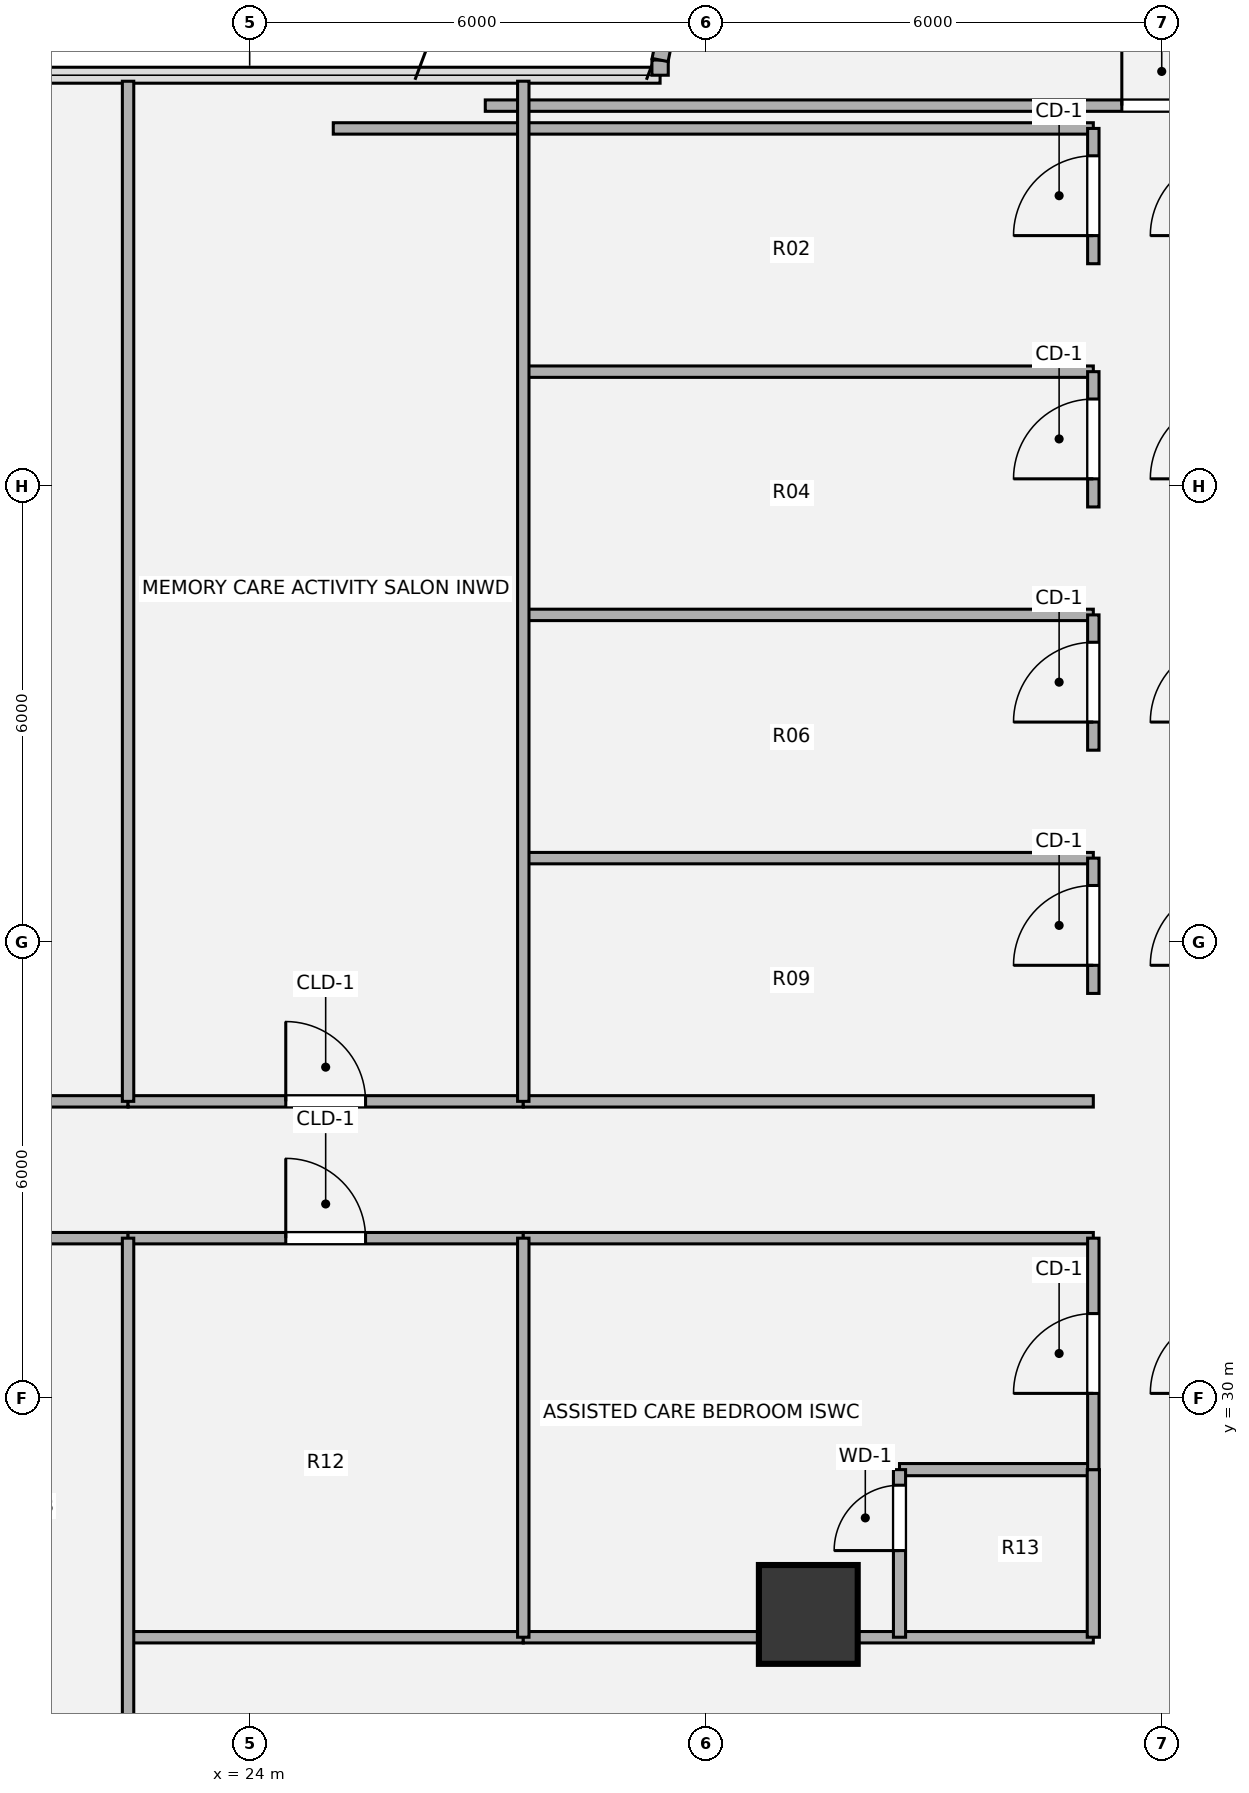
"""IFC4 building model, lengths in metres.
Left out: names, types, materials, properties, quantities, classifications, styles, units other than length and angle.
Written with IfcOpenShell. Run it as: python <this file> out.ifc"""

import sys

from ifc_helpers import new_model, si_unit, direction, frame, frame_2d, origin, origin_2d, place, context, subcontext, project, spatial, rectangle, hollow_circle, extrude, source, transform, mapped, element, fill, save


model = new_model("IFC4")
c1 = context("Model", 3, precision=1e-05, world=origin(), true_north=direction((0.0, 1.0)))
c2 = subcontext(c1, "Body", "Model", "MODEL_VIEW")
j1 = project(units=[si_unit("LENGTHUNIT", "METRE"), si_unit("PLANEANGLEUNIT", "RADIAN")], contexts=[c1])
p1 = place(None, origin())
s1 = spatial("IfcSite", under=j1, at=p1, CompositionType="ELEMENT")
p2 = place(p1, origin())
s2 = spatial("IfcBuilding", under=s1, at=p2, CompositionType="ELEMENT")
p3 = place(p2, frame((0.0, 0.0, 104.94)))
s3 = spatial("IfcBuildingStorey", under=s2, at=p3, CompositionType="ELEMENT", Elevation=104.94)
m1 = source(origin(), c2, "Body", "SweptSolid", [
    extrude(hollow_circle(Radius=0.65, WallThickness=0.045, at=origin_2d()), origin(), (0.0, 0.0, 1.0), 3.78),
])
p4 = place(p3, frame((31.35, 27.15, 0.0), z_axis=(0.0, 0.0, 1.0), x_axis=(1.0, 0.0, 0.0)))
e1 = element("IfcColumn", 1, at=p4, inside=s3, PredefinedType="COLUMN", context=c2, shape_type="MappedRepresentation", body=[
    mapped(m1, transform((0.0, 0.0, 0.0), x_axis=(1.0, 0.0, 0.0), y_axis=(0.0, 1.0, 0.0), z_axis=(0.0, 0.0, 1.0), scale=1.0)),
])
p5 = place(p3, frame((29.4, 47.4, 0.0), z_axis=(0.0, 0.0, 1.0), x_axis=(0.0, 1.0, 0.0)))
e2 = element("IfcWall", 2, at=p5, inside=s3, PredefinedType="SOLIDWALL", context=c2, shape_type="SweptSolid", body=[
    extrude(rectangle(XDim=0.2, YDim=0.215, at=frame_2d((0.1, 0.0))), origin(), (0.0, 0.0, 1.0), 3.53),
])
p6 = place(p3, frame((29.4, 47.6, 0.0), z_axis=(0.0, 0.0, 1.0), x_axis=(0.195127417394, 0.980777900945, 0.0)))
e3 = element("IfcWall", 3, at=p6, inside=s3, PredefinedType="SOLIDWALL", context=c2, shape_type="SweptSolid", body=[
    extrude(rectangle(XDim=1.092, YDim=0.215, at=frame_2d((0.546, 0.0))), origin(), (0.0, 0.0, 1.0), 3.53),
])
p7 = place(p3, frame((22.4, 26.85, 0.0), z_axis=(0.0, 0.0, 1.0), x_axis=(1.0, 0.0, 0.0)))
e4 = element("IfcWall", 4, at=p7, inside=s3, PredefinedType="PARTITIONING", context=c2, shape_type="SweptSolid", body=[
    extrude(rectangle(XDim=5.2, YDim=0.15, at=frame_2d((2.6, 0.0))), origin(), (0.0, 0.0, 1.0), 3.055),
])
p8 = place(p3, frame((27.6, 26.85, 0.0), z_axis=(0.0, 0.0, 1.0), x_axis=(1.0, 0.0, 0.0)))
e5 = element("IfcWall", 5, at=p8, inside=s3, PredefinedType="PARTITIONING", context=c2, shape_type="SweptSolid", body=[
    extrude(rectangle(XDim=7.5, YDim=0.15, at=frame_2d((3.75, 0.0))), origin(), (0.0, 0.0, 1.0), 2.903),
])
p9 = place(p3, frame((32.55, 29.055, 0.0), z_axis=(0.0, 0.0, 1.0), x_axis=(1.0, 0.0, 0.0)))
e6 = element("IfcWall", 6, at=p9, inside=s3, PredefinedType="PLUMBINGWALL", context=c2, shape_type="SweptSolid", body=[
    extrude(rectangle(XDim=2.55, YDim=0.16, at=frame_2d((1.275, 0.0))), origin(), (0.0, 0.0, 1.0), 3.259),
])
p10 = place(p3, frame((13.98, 32.1, 0.0), z_axis=(0.0, 0.0, 1.0), x_axis=(1.0, 0.0, 0.0)))
e7 = element("IfcWall", 7, at=p10, inside=s3, PredefinedType="PARTITIONING", context=c2, shape_type="SweptSolid", body=[
    extrude(rectangle(XDim=8.42, YDim=0.15, at=frame_2d((4.21, 0.0))), origin(), (0.0, 0.0, 1.0), 2.982),
])
p11 = place(p10, frame((5.995, 0.0, 0.0)))
e8 = element("IfcOpeningElement", 8, at=p11, cuts=e7, PredefinedType="OPENING", context=c2, shape_type="SweptSolid", body=[
    extrude(rectangle(XDim=1.05, YDim=2.1, at=origin_2d()), frame((0.525, 0.085, 1.05), z_axis=(0.0, -1.0, 0.0), x_axis=(1.0, 0.0, 0.0)), (0.0, 0.0, 1.0), 0.17),
])
p12 = place(p3, frame((22.4, 32.1, 0.0), z_axis=(0.0, 0.0, 1.0), x_axis=(1.0, 0.0, 0.0)))
e9 = element("IfcWall", 9, at=p12, inside=s3, PredefinedType="PARTITIONING", context=c2, shape_type="SweptSolid", body=[
    extrude(rectangle(XDim=5.2, YDim=0.15, at=frame_2d((2.6, 0.0))), origin(), (0.0, 0.0, 1.0), 2.982),
])
p13 = place(p12, frame((2.075, 0.0, 0.0)))
e10 = element("IfcOpeningElement", 10, at=p13, cuts=e9, PredefinedType="OPENING", context=c2, shape_type="SweptSolid", body=[
    extrude(rectangle(XDim=1.05, YDim=2.1, at=origin_2d()), frame((0.525, 0.085, 1.05), z_axis=(0.0, -1.0, 0.0), x_axis=(1.0, 0.0, 0.0)), (0.0, 0.0, 1.0), 0.17),
])
p14 = place(p3, frame((27.6, 32.1, 0.0), z_axis=(0.0, 0.0, 1.0), x_axis=(1.0, 0.0, 0.0)))
e11 = element("IfcWall", 11, at=p14, inside=s3, PredefinedType="PARTITIONING", context=c2, shape_type="SweptSolid", body=[
    extrude(rectangle(XDim=7.5, YDim=0.15, at=frame_2d((3.75, 0.0))), origin(), (0.0, 0.0, 1.0), 2.982),
])
p15 = place(p3, frame((13.98, 33.9, 0.0), z_axis=(0.0, 0.0, 1.0), x_axis=(1.0, 0.0, 0.0)))
e12 = element("IfcWall", 12, at=p15, inside=s3, PredefinedType="PARTITIONING", context=c2, shape_type="SweptSolid", body=[
    extrude(rectangle(XDim=8.42, YDim=0.15, at=frame_2d((4.21, 0.0))), origin(), (0.0, 0.0, 1.0), 2.982),
])
p16 = place(p15, frame((5.995, 0.0, 0.0)))
e13 = element("IfcOpeningElement", 13, at=p16, cuts=e12, PredefinedType="OPENING", context=c2, shape_type="SweptSolid", body=[
    extrude(rectangle(XDim=1.05, YDim=2.1, at=origin_2d()), frame((0.525, 0.085, 1.05), z_axis=(0.0, -1.0, 0.0), x_axis=(1.0, 0.0, 0.0)), (0.0, 0.0, 1.0), 0.17),
])
p17 = place(p3, frame((22.4, 33.9, 0.0), z_axis=(0.0, 0.0, 1.0), x_axis=(1.0, 0.0, 0.0)))
e14 = element("IfcWall", 14, at=p17, inside=s3, PredefinedType="PARTITIONING", context=c2, shape_type="SweptSolid", body=[
    extrude(rectangle(XDim=5.2, YDim=0.15, at=frame_2d((2.6, 0.0))), origin(), (0.0, 0.0, 1.0), 2.982),
])
p18 = place(p17, frame((2.075, 0.0, 0.0)))
e15 = element("IfcOpeningElement", 15, at=p18, cuts=e14, PredefinedType="OPENING", context=c2, shape_type="SweptSolid", body=[
    extrude(rectangle(XDim=1.05, YDim=2.1, at=origin_2d()), frame((0.525, 0.085, 1.05), z_axis=(0.0, -1.0, 0.0), x_axis=(1.0, 0.0, 0.0)), (0.0, 0.0, 1.0), 0.17),
])
for number, where, z_axis, x_axis in (
    (16, (27.6, 33.9, 0.0), (0.0, 0.0, 1.0), (1.0, 0.0, 0.0)),
    (17, (27.6, 37.1, 0.0), (0.0, 0.0, 1.0), (1.0, 0.0, 0.0)),
):
    element("IfcWall", number, at=place(p3, frame(where, z_axis=z_axis, x_axis=x_axis)), inside=s3, PredefinedType="PARTITIONING", context=c2, shape_type="SweptSolid", body=[
        extrude(rectangle(XDim=7.5, YDim=0.15, at=frame_2d((3.75, 0.0))), origin(), (0.0, 0.0, 1.0), 2.982),
    ])
p19 = place(p3, frame((27.6, 40.3, 0.0), z_axis=(0.0, 0.0, 1.0), x_axis=(1.0, 0.0, 0.0)))
e18 = element("IfcWall", 18, at=p19, inside=s3, PredefinedType="PARTITIONING", context=c2, shape_type="SweptSolid", body=[
    extrude(rectangle(XDim=7.5, YDim=0.15, at=frame_2d((3.75, 0.0))), origin(), (0.0, 0.0, 1.0), 3.259),
])
p20 = place(p3, frame((27.6, 43.5, 0.0), z_axis=(0.0, 0.0, 1.0), x_axis=(1.0, 0.0, 0.0)))
e19 = element("IfcWall", 19, at=p20, inside=s3, PredefinedType="PARTITIONING", context=c2, shape_type="SweptSolid", body=[
    extrude(rectangle(XDim=7.5, YDim=0.15, at=frame_2d((3.75, 0.0))), origin(), (0.0, 0.0, 1.0), 3.308),
])
p21 = place(p3, frame((25.1, 46.7, 0.0), z_axis=(0.0, 0.0, 1.0), x_axis=(1.0, 0.0, 0.0)))
e20 = element("IfcWall", 20, at=p21, inside=s3, PredefinedType="PARTITIONING", context=c2, shape_type="SweptSolid", body=[
    extrude(rectangle(XDim=10.0, YDim=0.15, at=frame_2d((5.0, 0.0))), origin(), (0.0, 0.0, 1.0), 3.308),
])
p22 = place(p3, frame((27.1, 47.0, 0.0), z_axis=(0.0, 0.0, 1.0), x_axis=(1.0, 0.0, 0.0)))
e21 = element("IfcWall", 21, at=p22, inside=s3, PredefinedType="PARTITIONING", context=c2, shape_type="SweptSolid", body=[
    extrude(rectangle(XDim=17.8, YDim=0.15, at=frame_2d((8.9, 0.0))), origin(), (0.0, 0.0, 1.0), 3.308),
])
p23 = place(p22, frame((8.375, 0.0, 0.0)))
e22 = element("IfcOpeningElement", 22, at=p23, cuts=e21, PredefinedType="OPENING", context=c2, shape_type="SweptSolid", body=[
    extrude(rectangle(XDim=1.05, YDim=2.1, at=origin_2d()), frame((0.525, 0.085, 1.05), z_axis=(0.0, -1.0, 0.0), x_axis=(1.0, 0.0, 0.0)), (0.0, 0.0, 1.0), 0.17),
])
p24 = place(p3, frame((22.4, 25.4, 0.0), z_axis=(0.0, 0.0, 1.0), x_axis=(0.0, 1.0, 0.0)))
e23 = element("IfcWall", 23, at=p24, inside=s3, PredefinedType="PARTITIONING", context=c2, shape_type="SweptSolid", body=[
    extrude(rectangle(XDim=6.7, YDim=0.15, at=frame_2d((3.35, 0.0))), origin(), (0.0, 0.0, 1.0), 3.5),
])
p25 = place(p3, frame((22.4, 33.9, 0.0), z_axis=(0.0, 0.0, 1.0), x_axis=(0.0, 1.0, 0.0)))
e24 = element("IfcWall", 24, at=p25, inside=s3, PredefinedType="PARTITIONING", context=c2, shape_type="SweptSolid", body=[
    extrude(rectangle(XDim=13.421, YDim=0.15, at=frame_2d((6.71, 0.0))), origin(), (0.0, 0.0, 1.0), 3.5),
])
p26 = place(p3, frame((27.6, 26.85, 0.0), z_axis=(0.0, 0.0, 1.0), x_axis=(0.0, 1.0, 0.0)))
e25 = element("IfcWall", 25, at=p26, inside=s3, PredefinedType="PARTITIONING", context=c2, shape_type="SweptSolid", body=[
    extrude(rectangle(XDim=5.25, YDim=0.15, at=frame_2d((2.625, 0.0))), origin(), (0.0, 0.0, 1.0), 3.5),
])
p27 = place(p3, frame((27.6, 33.9, 0.0), z_axis=(0.0, 0.0, 1.0), x_axis=(0.0, 1.0, 0.0)))
e26 = element("IfcWall", 26, at=p27, inside=s3, PredefinedType="PARTITIONING", context=c2, shape_type="SweptSolid", body=[
    extrude(rectangle(XDim=13.421, YDim=0.15, at=frame_2d((6.711, 0.0))), origin(), (0.0, 0.0, 1.0), 3.5),
])
p28 = place(p3, frame((32.55, 26.85, 0.0), z_axis=(0.0, 0.0, 1.0), x_axis=(0.0, 1.0, 0.0)))
e27 = element("IfcWall", 27, at=p28, inside=s3, PredefinedType="PLUMBINGWALL", context=c2, shape_type="SweptSolid", body=[
    extrude(rectangle(XDim=2.205, YDim=0.16, at=frame_2d((1.103, 0.0))), origin(), (0.0, 0.0, 1.0), 3.5),
])
p29 = place(p28, frame((1.14, 0.0, 0.0)))
e28 = element("IfcOpeningElement", 28, at=p29, cuts=e27, PredefinedType="OPENING", context=c2, shape_type="SweptSolid", body=[
    extrude(rectangle(XDim=0.86, YDim=2.1, at=origin_2d()), frame((0.43, 0.09, 1.05), z_axis=(0.0, -1.0, 0.0), x_axis=(1.0, 0.0, 0.0)), (0.0, 0.0, 1.0), 0.18),
])
p30 = place(p3, frame((35.1, 26.85, 0.0), z_axis=(0.0, 0.0, 1.0), x_axis=(0.0, 1.0, 0.0)))
e29 = element("IfcWall", 29, at=p30, inside=s3, PredefinedType="PLUMBINGWALL", context=c2, shape_type="SweptSolid", body=[
    extrude(rectangle(XDim=2.205, YDim=0.16, at=frame_2d((1.103, 0.0))), origin(), (0.0, 0.0, 1.0), 3.5),
])
p31 = place(p3, frame((35.1, 29.055, 0.0), z_axis=(0.0, 0.0, 1.0), x_axis=(0.0, 1.0, 0.0)))
e30 = element("IfcWall", 30, at=p31, inside=s3, PredefinedType="PARTITIONING", context=c2, shape_type="SweptSolid", body=[
    extrude(rectangle(XDim=3.045, YDim=0.15, at=frame_2d((1.522, 0.0))), origin(), (0.0, 0.0, 1.0), 3.5),
])
p32 = place(p31, frame((1.003, 0.0, 0.0)))
e31 = element("IfcOpeningElement", 31, at=p32, cuts=e30, PredefinedType="OPENING", context=c2, shape_type="SweptSolid", body=[
    extrude(rectangle(XDim=1.05, YDim=2.1, at=origin_2d()), frame((0.525, 0.085, 1.05), z_axis=(0.0, -1.0, 0.0), x_axis=(1.0, 0.0, 0.0)), (0.0, 0.0, 1.0), 0.17),
])
p33 = place(p3, frame((35.1, 35.32, 0.0), z_axis=(0.0, 0.0, 1.0), x_axis=(0.0, 1.0, 0.0)))
e32 = element("IfcWall", 32, at=p33, inside=s3, PredefinedType="PARTITIONING", context=c2, shape_type="SweptSolid", body=[
    extrude(rectangle(XDim=1.78, YDim=0.15, at=frame_2d((0.89, 0.0))), origin(), (0.0, 0.0, 1.0), 3.5),
])
p34 = place(p33, frame((0.37, 0.0, 0.0)))
e33 = element("IfcOpeningElement", 33, at=p34, cuts=e32, PredefinedType="OPENING", context=c2, shape_type="SweptSolid", body=[
    extrude(rectangle(XDim=1.05, YDim=2.1, at=origin_2d()), frame((0.525, 0.085, 1.05), z_axis=(0.0, -1.0, 0.0), x_axis=(1.0, 0.0, 0.0)), (0.0, 0.0, 1.0), 0.17),
])
p35 = place(p3, frame((35.1, 38.52, 0.0), z_axis=(0.0, 0.0, 1.0), x_axis=(0.0, 1.0, 0.0)))
e34 = element("IfcWall", 34, at=p35, inside=s3, PredefinedType="PARTITIONING", context=c2, shape_type="SweptSolid", body=[
    extrude(rectangle(XDim=1.78, YDim=0.15, at=frame_2d((0.89, 0.0))), origin(), (0.0, 0.0, 1.0), 3.5),
])
p36 = place(p35, frame((0.37, 0.0, 0.0)))
e35 = element("IfcOpeningElement", 35, at=p36, cuts=e34, PredefinedType="OPENING", context=c2, shape_type="SweptSolid", body=[
    extrude(rectangle(XDim=1.05, YDim=2.1, at=origin_2d()), frame((0.525, 0.085, 1.05), z_axis=(0.0, -1.0, 0.0), x_axis=(1.0, 0.0, 0.0)), (0.0, 0.0, 1.0), 0.17),
])
p37 = place(p3, frame((35.1, 41.72, 0.0), z_axis=(0.0, 0.0, 1.0), x_axis=(0.0, 1.0, 0.0)))
e36 = element("IfcWall", 36, at=p37, inside=s3, PredefinedType="PARTITIONING", context=c2, shape_type="SweptSolid", body=[
    extrude(rectangle(XDim=1.78, YDim=0.15, at=frame_2d((0.89, 0.0))), origin(), (0.0, 0.0, 1.0), 3.5),
])
p38 = place(p37, frame((0.37, 0.0, 0.0)))
e37 = element("IfcOpeningElement", 37, at=p38, cuts=e36, PredefinedType="OPENING", context=c2, shape_type="SweptSolid", body=[
    extrude(rectangle(XDim=1.05, YDim=2.1, at=origin_2d()), frame((0.525, 0.085, 1.05), z_axis=(0.0, -1.0, 0.0), x_axis=(1.0, 0.0, 0.0)), (0.0, 0.0, 1.0), 0.17),
])
p39 = place(p3, frame((35.1, 44.92, 0.0), z_axis=(0.0, 0.0, 1.0), x_axis=(0.0, 1.0, 0.0)))
e38 = element("IfcWall", 38, at=p39, inside=s3, PredefinedType="PARTITIONING", context=c2, shape_type="SweptSolid", body=[
    extrude(rectangle(XDim=1.78, YDim=0.15, at=frame_2d((0.89, 0.0))), origin(), (0.0, 0.0, 1.0), 3.5),
])
p40 = place(p39, frame((0.37, 0.0, 0.0)))
e39 = element("IfcOpeningElement", 39, at=p40, cuts=e38, PredefinedType="OPENING", context=c2, shape_type="SweptSolid", body=[
    extrude(rectangle(XDim=1.05, YDim=2.1, at=origin_2d()), frame((0.525, 0.085, 1.05), z_axis=(0.0, -1.0, 0.0), x_axis=(1.0, 0.0, 0.0)), (0.0, 0.0, 1.0), 0.17),
])
m2 = source(origin(), c2, "Body", "SweptSolid", [
    extrude(rectangle(XDim=1.05, YDim=2.1, at=origin_2d()), frame((0.525, 0.025, 1.05), z_axis=(0.0, -1.0, 0.0), x_axis=(1.0, 0.0, 0.0)), (0.0, 0.0, 1.0), 0.05),
])
p41 = place(p13, origin())
e40 = element("IfcDoor", 40, at=p41, inside=s3, OperationType="SINGLE_SWING_LEFT", PredefinedType="DOOR", context=c2, shape_type="MappedRepresentation", body=[
    mapped(m2, transform((0.0, 0.0, 0.0), x_axis=(1.0, 0.0, 0.0), y_axis=(0.0, 1.0, 0.0), z_axis=(0.0, 0.0, 1.0), scale=1.0)),
])
fill(e10, e40)
p42 = place(p18, origin())
e41 = element("IfcDoor", 41, at=p42, inside=s3, OperationType="SINGLE_SWING_LEFT", PredefinedType="DOOR", context=c2, shape_type="MappedRepresentation", body=[
    mapped(m2, transform((0.0, 0.0, 0.0), x_axis=(1.0, 0.0, 0.0), y_axis=(0.0, 1.0, 0.0), z_axis=(0.0, 0.0, 1.0), scale=1.0)),
])
fill(e15, e41)
p43 = place(p23, origin())
e42 = element("IfcDoor", 42, at=p43, inside=s3, OperationType="SINGLE_SWING_LEFT", PredefinedType="DOOR", context=c2, shape_type="MappedRepresentation", body=[
    mapped(m2, transform((0.0, 0.0, 0.0), x_axis=(1.0, 0.0, 0.0), y_axis=(0.0, 1.0, 0.0), z_axis=(0.0, 0.0, 1.0), scale=1.0)),
])
fill(e22, e42)
m3 = source(origin(), c2, "Body", "SweptSolid", [
    extrude(rectangle(XDim=0.86, YDim=2.1, at=origin_2d()), frame((0.43, 0.025, 1.05), z_axis=(0.0, -1.0, 0.0), x_axis=(1.0, 0.0, 0.0)), (0.0, 0.0, 1.0), 0.05),
])
p44 = place(p29, origin())
e43 = element("IfcDoor", 43, at=p44, inside=s3, OperationType="SINGLE_SWING_LEFT", PredefinedType="DOOR", context=c2, shape_type="MappedRepresentation", body=[
    mapped(m3, transform((0.0, 0.0, 0.0), x_axis=(1.0, 0.0, 0.0), y_axis=(0.0, 1.0, 0.0), z_axis=(0.0, 0.0, 1.0), scale=1.0)),
])
fill(e28, e43)
m4 = source(origin(), c2, "Body", "SweptSolid", [
    extrude(rectangle(XDim=1.05, YDim=2.1, at=origin_2d()), frame((0.525, 0.025, 1.05), z_axis=(0.0, -1.0, 0.0), x_axis=(1.0, 0.0, 0.0)), (0.0, 0.0, 1.0), 0.05),
])
p45 = place(p32, origin())
e44 = element("IfcDoor", 44, at=p45, inside=s3, OperationType="SINGLE_SWING_LEFT", PredefinedType="DOOR", context=c2, shape_type="MappedRepresentation", body=[
    mapped(m4, transform((0.0, 0.0, 0.0), x_axis=(1.0, 0.0, 0.0), y_axis=(0.0, 1.0, 0.0), z_axis=(0.0, 0.0, 1.0), scale=1.0)),
])
fill(e31, e44)
p46 = place(p34, origin())
e45 = element("IfcDoor", 45, at=p46, inside=s3, OperationType="SINGLE_SWING_LEFT", PredefinedType="DOOR", context=c2, shape_type="MappedRepresentation", body=[
    mapped(m4, transform((0.0, 0.0, 0.0), x_axis=(1.0, 0.0, 0.0), y_axis=(0.0, 1.0, 0.0), z_axis=(0.0, 0.0, 1.0), scale=1.0)),
])
fill(e33, e45)
p47 = place(p36, origin())
e46 = element("IfcDoor", 46, at=p47, inside=s3, OperationType="SINGLE_SWING_LEFT", PredefinedType="DOOR", context=c2, shape_type="MappedRepresentation", body=[
    mapped(m4, transform((0.0, 0.0, 0.0), x_axis=(1.0, 0.0, 0.0), y_axis=(0.0, 1.0, 0.0), z_axis=(0.0, 0.0, 1.0), scale=1.0)),
])
fill(e35, e46)
p48 = place(p38, origin())
e47 = element("IfcDoor", 47, at=p48, inside=s3, OperationType="SINGLE_SWING_LEFT", PredefinedType="DOOR", context=c2, shape_type="MappedRepresentation", body=[
    mapped(m4, transform((0.0, 0.0, 0.0), x_axis=(1.0, 0.0, 0.0), y_axis=(0.0, 1.0, 0.0), z_axis=(0.0, 0.0, 1.0), scale=1.0)),
])
fill(e37, e47)
p49 = place(p40, origin())
e48 = element("IfcDoor", 48, at=p49, inside=s3, OperationType="SINGLE_SWING_LEFT", PredefinedType="DOOR", context=c2, shape_type="MappedRepresentation", body=[
    mapped(m4, transform((0.0, 0.0, 0.0), x_axis=(1.0, 0.0, 0.0), y_axis=(0.0, 1.0, 0.0), z_axis=(0.0, 0.0, 1.0), scale=1.0)),
])
fill(e39, e48)
save(model, sys.argv[1])
